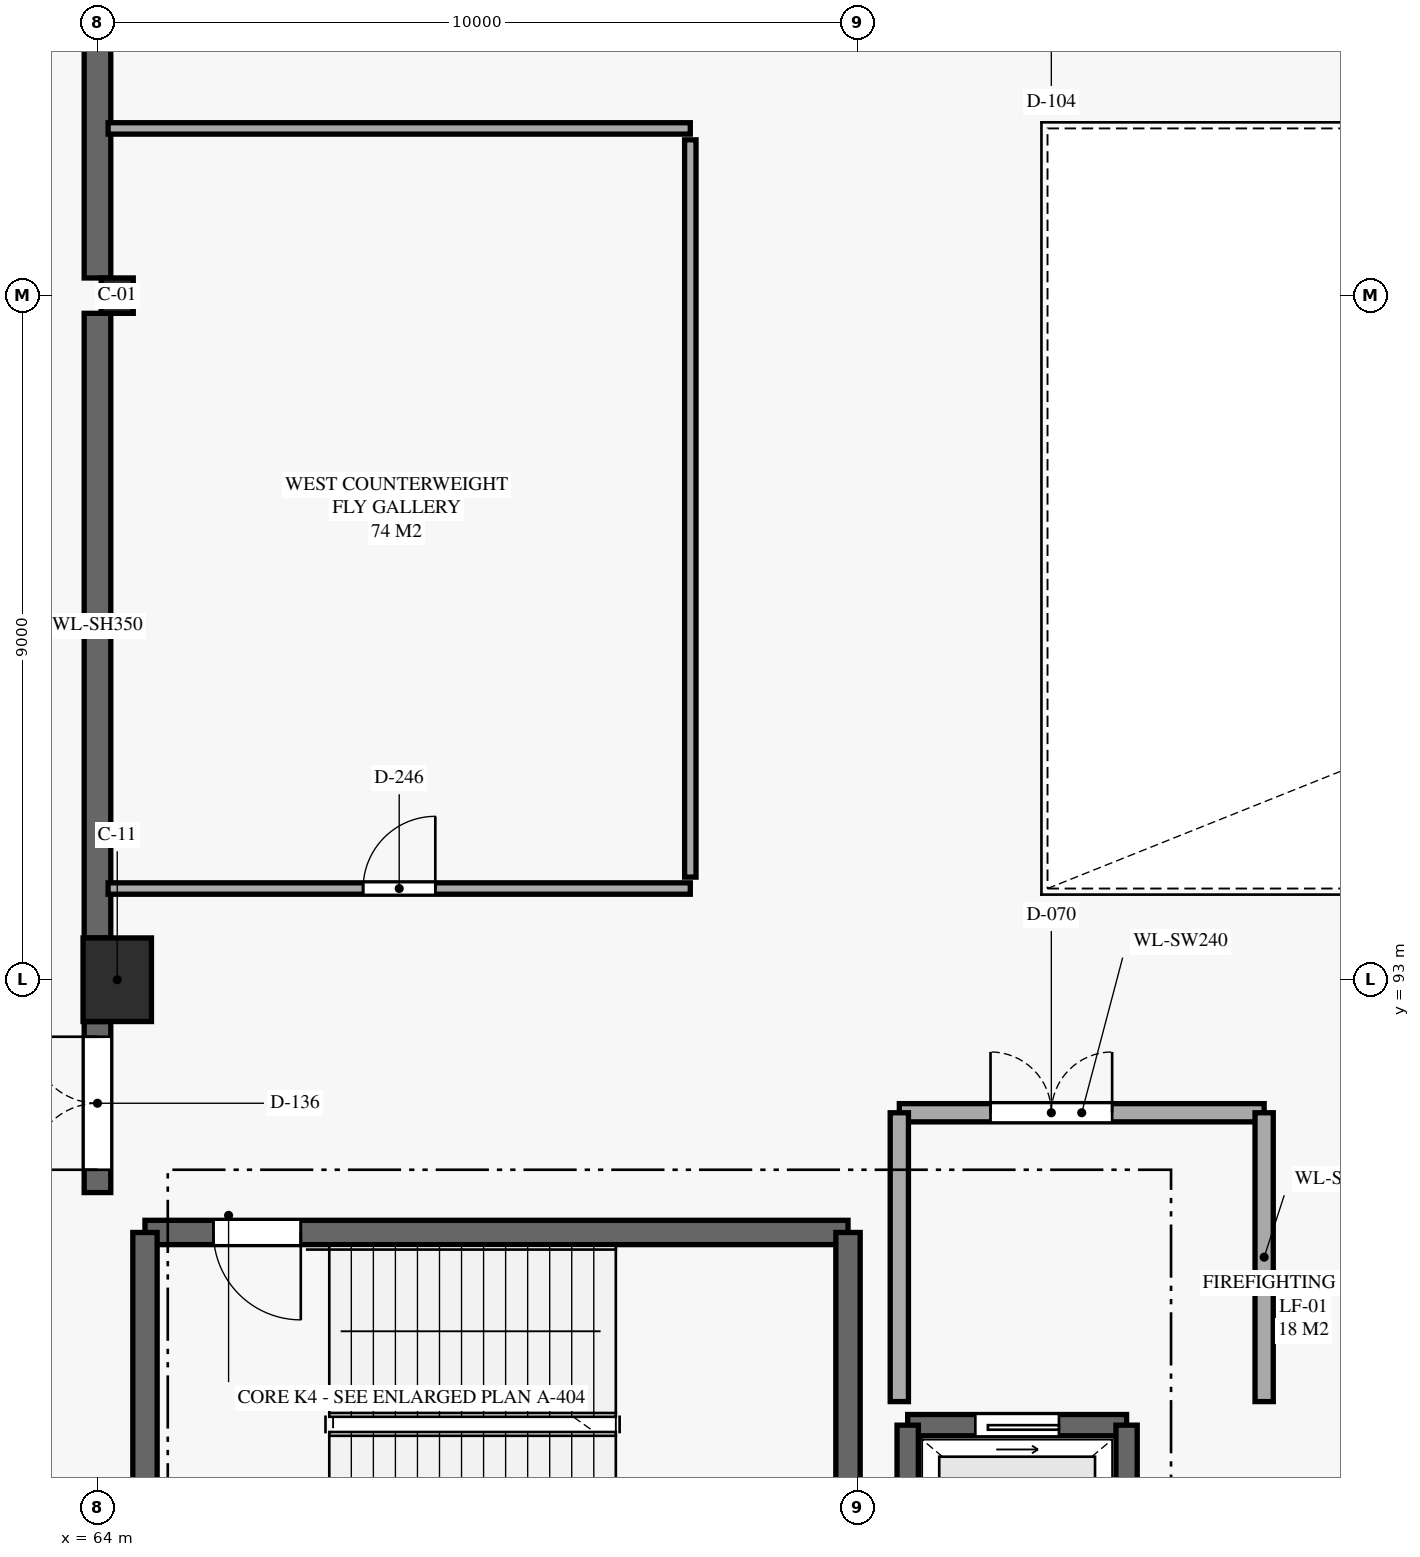
"""IFC4 building model, lengths in metres.
Left out: names, types, materials, properties, quantities, classifications, styles, units other than length and angle.
Written with IfcOpenShell. Run it as: python <this file> out.ifc"""

import sys

from ifc_helpers import new_model, si_unit, direction, frame, frame_2d, origin, origin_2d, place, context, subcontext, project, spatial, rectangle, i_section, extrude, element, fill, save


model = new_model("IFC4")
c1 = context("Model", 3, precision=1e-05, world=origin(), true_north=direction((0.0, 1.0)))
c2 = subcontext(c1, "Body", "Model", "MODEL_VIEW")
j1 = project(units=[si_unit("LENGTHUNIT", "METRE"), si_unit("PLANEANGLEUNIT", "RADIAN")], contexts=[c1])
p1 = place(None, origin())
s1 = spatial("IfcSite", under=j1, at=p1, CompositionType="ELEMENT")
p2 = place(p1, origin())
s2 = spatial("IfcBuilding", under=s1, at=p2, CompositionType="ELEMENT")
p3 = place(p2, frame((0.0, 0.0, 24.8)))
s3 = spatial("IfcBuildingStorey", under=s2, at=p3, CompositionType="ELEMENT", Elevation=24.8)
p4 = place(p3, frame((64.26, 93.0, 0.0), z_axis=(0.0, 0.0, 1.0), x_axis=(1.0, 0.0, 0.0)))
e1 = element("IfcColumn", 1, at=p4, inside=s3, PredefinedType="COLUMN", context=c2, shape_type="SweptSolid", body=[
    extrude(rectangle(XDim=0.9, YDim=1.1, at=origin_2d()), origin(), (0.0, 0.0, 1.0), 4.8),
])
p5 = place(p3, frame((64.26, 102.0, 0.0), z_axis=(0.0, 0.0, 1.0), x_axis=(1.0, 0.0, 0.0)))
e2 = element("IfcColumn", 2, at=p5, inside=s3, PredefinedType="COLUMN", context=c2, shape_type="SweptSolid", body=[
    extrude(i_section(OverallWidth=0.422, OverallDepth=0.465, WebThickness=0.045, FlangeThickness=0.073, FilletRadius=0.02, at=origin_2d()), origin(), (0.0, 0.0, 1.0), 4.8),
])
p6 = place(p3, frame((73.875, 89.675, 0.0), z_axis=(0.0, 0.0, 1.0), x_axis=(-1.0, 0.0, 0.0)))
e3 = element("IfcWall", 3, at=p6, inside=s3, PredefinedType="SHEAR", context=c2, shape_type="SweptSolid", body=[
    extrude(rectangle(XDim=9.25, YDim=0.32, at=frame_2d((4.625, 0.0))), origin(), (0.0, 0.0, 1.0), 4.56),
])
p7 = place(p6, frame((7.2, 0.0, 0.0)))
e4 = element("IfcOpeningElement", 4, at=p7, cuts=e3, PredefinedType="OPENING", context=c2, shape_type="SweptSolid", body=[
    extrude(rectangle(XDim=1.15, YDim=2.2, at=frame_2d((0.575, 1.1))), frame((0.0, 0.17, 0.0), z_axis=(0.0, -1.0, 0.0), x_axis=(1.0, 0.0, 0.0)), (0.0, 0.0, 1.0), 0.34),
])
for number, where, z_axis, x_axis in (
    (5, (64.625, 89.675, 0.0), (0.0, 0.0, 1.0), (0.0, -1.0, 0.0)),
    (6, (73.875, 84.625, 0.0), (0.0, 0.0, 1.0), (0.0, 1.0, 0.0)),
):
    element("IfcWall", number, at=place(p3, frame(where, z_axis=z_axis, x_axis=x_axis)), inside=s3, PredefinedType="SHEAR", context=c2, shape_type="SweptSolid", body=[
        extrude(rectangle(XDim=5.05, YDim=0.32, at=frame_2d((2.525, 0.0))), origin(), (0.0, 0.0, 1.0), 4.56),
    ])
p8 = place(p3, frame((77.54, 87.14, 0.0), z_axis=(0.0, 0.0, 1.0), x_axis=(-1.0, 0.0, 0.0)))
e7 = element("IfcWall", 7, at=p8, inside=s3, PredefinedType="SHEAR", context=c2, shape_type="SweptSolid", body=[
    extrude(rectangle(XDim=2.88, YDim=0.28, at=frame_2d((1.44, 0.0))), origin(), (0.0, 0.0, 1.0), 4.56),
])
p9 = place(p8, frame((0.89, 0.0, 0.0)))
e8 = element("IfcOpeningElement", 8, at=p9, cuts=e7, PredefinedType="OPENING", context=c2, shape_type="SweptSolid", body=[
    extrude(rectangle(XDim=1.1, YDim=2.2, at=frame_2d((0.55, 1.1))), frame((0.0, 0.15, 0.0), z_axis=(0.0, -1.0, 0.0), x_axis=(1.0, 0.0, 0.0)), (0.0, 0.0, 1.0), 0.3),
])
for number, where, z_axis, x_axis in (
    (9, (74.66, 87.14, 0.0), (0.0, 0.0, 1.0), (0.0, -1.0, 0.0)),
    (10, (77.54, 84.66, 0.0), (0.0, 0.0, 1.0), (0.0, 1.0, 0.0)),
):
    element("IfcWall", number, at=place(p3, frame(where, z_axis=z_axis, x_axis=x_axis)), inside=s3, PredefinedType="SHEAR", context=c2, shape_type="SweptSolid", body=[
        extrude(rectangle(XDim=2.48, YDim=0.28, at=frame_2d((1.24, 0.0))), origin(), (0.0, 0.0, 1.0), 4.56),
    ])
p10 = place(p3, frame((74.55, 91.25, 0.0), z_axis=(0.0, 0.0, 1.0), x_axis=(1.0, 0.0, 0.0)))
e11 = element("IfcWall", 11, at=p10, inside=s3, PredefinedType="SOLIDWALL", context=c2, shape_type="SweptSolid", body=[
    extrude(rectangle(XDim=4.8, YDim=0.24, at=frame_2d((2.4, 0.0))), origin(), (0.0, 0.0, 1.0), 3.432),
])
p11 = place(p10, frame((1.2, 0.0, 0.0)))
e12 = element("IfcOpeningElement", 12, at=p11, cuts=e11, PredefinedType="OPENING", context=c2, shape_type="SweptSolid", body=[
    extrude(rectangle(XDim=1.6, YDim=2.2, at=frame_2d((0.8, 1.1))), frame((0.0, 0.13, 0.0), z_axis=(0.0, -1.0, 0.0), x_axis=(1.0, 0.0, 0.0)), (0.0, 0.0, 1.0), 0.26),
])
for number, where, z_axis, x_axis in (
    (13, (74.55, 91.25, 0.0), (0.0, 0.0, 1.0), (0.0, -1.0, 0.0)),
    (14, (79.35, 87.45, 0.0), (0.0, 0.0, 1.0), (0.0, 1.0, 0.0)),
):
    element("IfcWall", number, at=place(p3, frame(where, z_axis=z_axis, x_axis=x_axis)), inside=s3, PredefinedType="SOLIDWALL", context=c2, shape_type="SweptSolid", body=[
        extrude(rectangle(XDim=3.8, YDim=0.24, at=frame_2d((1.9, 0.0))), origin(), (0.0, 0.0, 1.0), 4.56),
    ])
p12 = place(p3, frame((64.0, 90.2, 0.0), z_axis=(0.0, 0.0, 1.0), x_axis=(0.0, 1.0, 0.0)))
e15 = element("IfcWall", 15, at=p12, inside=s3, PredefinedType="SHEAR", context=c2, shape_type="SweptSolid", body=[
    extrude(rectangle(XDim=2.25, YDim=0.35, at=frame_2d((1.125, 0.0))), origin(), (0.0, 0.0, 1.0), 4.56),
])
p13 = place(p12, frame((0.3, 0.0, 0.0)))
e16 = element("IfcOpeningElement", 16, at=p13, cuts=e15, PredefinedType="OPENING", context=c2, shape_type="SweptSolid", body=[
    extrude(rectangle(XDim=1.75, YDim=2.2, at=frame_2d((0.875, 1.1))), frame((0.0, 0.185, 0.0), z_axis=(0.0, -1.0, 0.0), x_axis=(1.0, 0.0, 0.0)), (0.0, 0.0, 1.0), 0.37),
])
p14 = place(p3, frame((64.0, 93.55, 0.0), z_axis=(0.0, 0.0, 1.0), x_axis=(0.0, 1.0, 0.0)))
e17 = element("IfcWall", 17, at=p14, inside=s3, PredefinedType="SHEAR", context=c2, shape_type="SweptSolid", body=[
    extrude(rectangle(XDim=8.218, YDim=0.35, at=frame_2d((4.109, 0.0))), origin(), (0.0, 0.0, 1.0), 4.56),
])
p15 = place(p3, frame((64.0, 102.232, 0.0), z_axis=(0.0, 0.0, 1.0), x_axis=(0.0, 1.0, 0.0)))
e18 = element("IfcWall", 18, at=p15, inside=s3, PredefinedType="SHEAR", context=c2, shape_type="SweptSolid", body=[
    extrude(rectangle(XDim=5.568, YDim=0.35, at=frame_2d((2.784, 0.0))), origin(), (0.0, 0.0, 1.0), 4.56),
])
p16 = place(p3, frame((64.14, 94.2, 0.0), z_axis=(0.0, 0.0, 1.0), x_axis=(1.0, 0.0, 0.0)))
e19 = element("IfcWall", 19, at=p16, inside=s3, PredefinedType="PARTITIONING", context=c2, shape_type="SweptSolid", body=[
    extrude(rectangle(XDim=7.66, YDim=0.15, at=frame_2d((3.83, 0.0))), origin(), (0.0, 0.0, 1.0), 4.56),
])
p17 = place(p16, frame((3.355, 0.0, 0.0)))
e20 = element("IfcOpeningElement", 20, at=p17, cuts=e19, PredefinedType="OPENING", context=c2, shape_type="SweptSolid", body=[
    extrude(rectangle(XDim=0.95, YDim=2.15, at=frame_2d((0.475, 1.075))), frame((0.0, 0.085, 0.0), z_axis=(0.0, -1.0, 0.0), x_axis=(1.0, 0.0, 0.0)), (0.0, 0.0, 1.0), 0.17),
])
p18 = place(p3, frame((71.8, 104.2, 0.0), z_axis=(0.0, 0.0, 1.0), x_axis=(-1.0, 0.0, 0.0)))
e21 = element("IfcWall", 21, at=p18, inside=s3, PredefinedType="PARTITIONING", context=c2, shape_type="SweptSolid", body=[
    extrude(rectangle(XDim=7.66, YDim=0.15, at=frame_2d((3.83, 0.0))), origin(), (0.0, 0.0, 1.0), 4.56),
])
p19 = place(p3, frame((71.8, 94.35, 0.0), z_axis=(0.0, 0.0, 1.0), x_axis=(0.0, 1.0, 0.0)))
e22 = element("IfcWall", 22, at=p19, inside=s3, PredefinedType="PARTITIONING", context=c2, shape_type="SweptSolid", body=[
    extrude(rectangle(XDim=9.7, YDim=0.15, at=frame_2d((4.85, 0.0))), origin(), (0.0, 0.0, 1.0), 4.56),
])
p20 = place(p7, origin())
e23 = element("IfcDoor", 23, at=p20, inside=s3, OperationType="SINGLE_SWING_LEFT", PredefinedType="DOOR", context=c2, shape_type="SweptSolid", body=[
    extrude(rectangle(XDim=1.15, YDim=2.2, at=frame_2d((0.575, 1.1))), frame((0.0, 0.025, 0.0), z_axis=(0.0, -1.0, 0.0), x_axis=(1.0, 0.0, 0.0)), (0.0, 0.0, 1.0), 0.05),
])
fill(e4, e23)
p21 = place(p9, origin())
e24 = element("IfcDoor", 24, at=p21, inside=s3, OperationType="SLIDING_TO_LEFT", PredefinedType="DOOR", context=c2, shape_type="SweptSolid", body=[
    extrude(rectangle(XDim=1.1, YDim=2.2, at=frame_2d((0.55, 1.1))), frame((0.0, 0.025, 0.0), z_axis=(0.0, -1.0, 0.0), x_axis=(1.0, 0.0, 0.0)), (0.0, 0.0, 1.0), 0.05),
])
fill(e8, e24)
p22 = place(p11, origin())
e25 = element("IfcDoor", 25, at=p22, inside=s3, OperationType="DOUBLE_DOOR_SINGLE_SWING", PredefinedType="DOOR", context=c2, shape_type="SweptSolid", body=[
    extrude(rectangle(XDim=1.6, YDim=2.2, at=frame_2d((0.8, 1.1))), frame((0.0, 0.025, 0.0), z_axis=(0.0, -1.0, 0.0), x_axis=(1.0, 0.0, 0.0)), (0.0, 0.0, 1.0), 0.05),
])
fill(e12, e25)
p23 = place(p13, origin())
e26 = element("IfcDoor", 26, at=p23, inside=s3, OperationType="DOUBLE_DOOR_SINGLE_SWING", PredefinedType="DOOR", context=c2, shape_type="SweptSolid", body=[
    extrude(rectangle(XDim=1.75, YDim=2.2, at=frame_2d((0.875, 1.1))), frame((0.0, 0.025, 0.0), z_axis=(0.0, -1.0, 0.0), x_axis=(1.0, 0.0, 0.0)), (0.0, 0.0, 1.0), 0.05),
])
fill(e16, e26)
p24 = place(p17, origin())
e27 = element("IfcDoor", 27, at=p24, inside=s3, OperationType="SINGLE_SWING_RIGHT", PredefinedType="DOOR", context=c2, shape_type="SweptSolid", body=[
    extrude(rectangle(XDim=0.95, YDim=2.15, at=frame_2d((0.475, 1.075))), frame((0.0, 0.025, 0.0), z_axis=(0.0, -1.0, 0.0), x_axis=(1.0, 0.0, 0.0)), (0.0, 0.0, 1.0), 0.05),
])
fill(e20, e27)
save(model, sys.argv[1])
